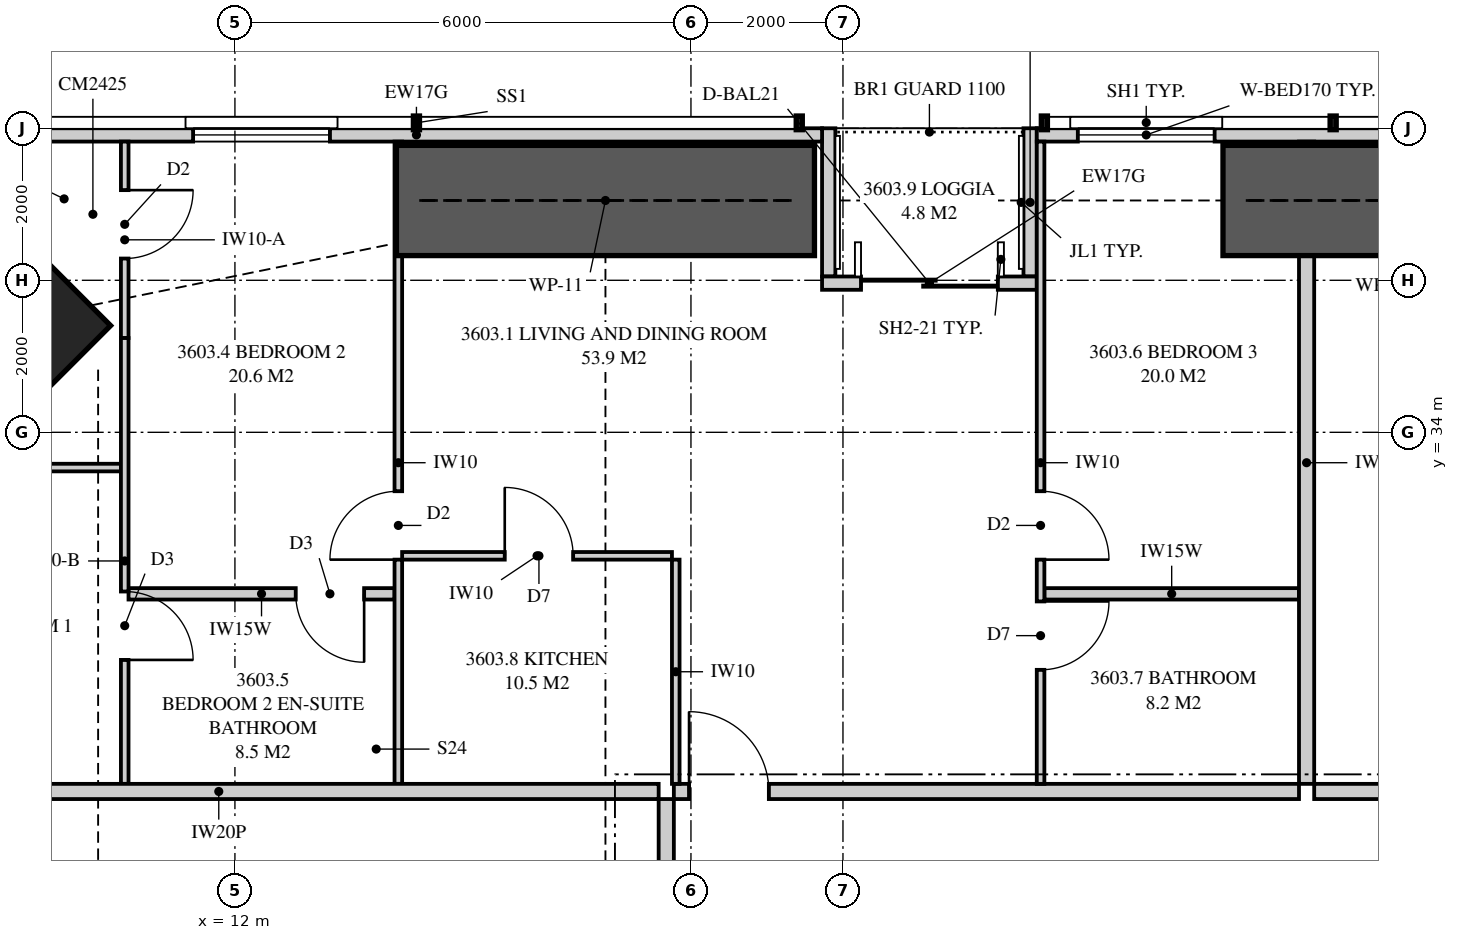
"""IFC4 building model, lengths in metres.
Left out: names, types, materials, properties, quantities, classifications, styles, units other than length and angle.
Written with IfcOpenShell. Run it as: python <this file> out.ifc"""

import sys

from ifc_helpers import new_model, si_unit, direction, frame, frame_2d, origin, origin_2d, place, context, subcontext, project, spatial, polyline, rectangle, outline, extrude, element, fill, save


model = new_model("IFC4")
c1 = context("Model", 3, precision=1e-05, world=origin(), true_north=direction((0.0, 1.0)))
c2 = subcontext(c1, "Body", "Model", "MODEL_VIEW")
j1 = project(units=[si_unit("LENGTHUNIT", "METRE"), si_unit("PLANEANGLEUNIT", "RADIAN")], contexts=[c1])
p1 = place(None, origin())
s1 = spatial("IfcSite", under=j1, at=p1, CompositionType="ELEMENT")
p2 = place(p1, origin())
s2 = spatial("IfcBuilding", under=s1, at=p2, CompositionType="ELEMENT")
p3 = place(p2, frame((0.0, 0.0, 131.65)))
s3 = spatial("IfcBuildingStorey", under=s2, at=p3, CompositionType="ELEMENT", Elevation=131.65)
p4 = place(p3, frame((8.631, 35.369, 0.0), z_axis=(0.0, 0.0, 1.0), x_axis=(0.707106781187, -0.707106781187, 0.0)))
e1 = element("IfcColumn", 1, at=p4, inside=s3, PredefinedType="COLUMN", context=c2, shape_type="SweptSolid", body=[
    extrude(rectangle(XDim=2.4, YDim=2.5, at=origin_2d()), origin(), (0.0, 0.0, 1.0), 3.35),
])
p5 = place(p3, frame((46.449, 37.913, 0.0), z_axis=(0.0, 0.0, 1.0), x_axis=(-1.0, 0.0, 0.0)))
e2 = element("IfcWall", 2, at=p5, inside=s3, PredefinedType="SOLIDWALL", context=c2, shape_type="SweptSolid", body=[
    extrude(outline(polyline([(0.0, 0.0), (23.899, 0.0), (23.899, 2.15), (7.824, 2.15), (7.824, 3.11), (7.666, 3.11), (7.666, 2.15), (7.62, 2.15), (7.62, 3.11), (0.0, 3.11), (0.0, 0.0)])), frame((0.0, 0.087, 0.0), z_axis=(0.0, -1.0, 0.0), x_axis=(1.0, 0.0, 0.0)), (0.0, 0.0, 1.0), 0.175),
])
p6 = place(p5, frame((10.9, 0.0, 0.4)))
e3 = element("IfcOpeningElement", 3, at=p6, cuts=e2, PredefinedType="OPENING", context=c2, shape_type="SweptSolid", body=[
    extrude(rectangle(XDim=1.2, YDim=1.7, at=frame_2d((0.6, 0.85))), frame((0.0, 0.097, 0.0), z_axis=(0.0, -1.0, 0.0), x_axis=(1.0, 0.0, 0.0)), (0.0, 0.0, 1.0), 0.195),
])
p7 = place(p5, frame((21.559, 0.0, 0.4)))
e4 = element("IfcOpeningElement", 4, at=p7, cuts=e2, PredefinedType="OPENING", context=c2, shape_type="SweptSolid", body=[
    extrude(rectangle(XDim=1.8, YDim=1.7, at=frame_2d((0.9, 0.85))), frame((0.0, 0.097, 0.0), z_axis=(0.0, -1.0, 0.0), x_axis=(1.0, 0.0, 0.0)), (0.0, 0.0, 1.0), 0.195),
])
p8 = place(p3, frame((19.725, 37.913, 0.0), z_axis=(0.0, 0.0, 1.0), x_axis=(-1.0, 0.0, 0.0)))
e5 = element("IfcWall", 5, at=p8, inside=s3, PredefinedType="SOLIDWALL", context=c2, shape_type="SweptSolid", body=[
    extrude(outline(polyline([(0.0, 0.0), (10.674, 0.0), (10.674, 3.11), (3.053, 3.11), (3.053, 2.15), (3.008, 2.15), (3.008, 3.11), (2.85, 3.11), (2.85, 2.15), (0.0, 2.15), (0.0, 0.0)])), frame((0.0, 0.087, 0.0), z_axis=(0.0, -1.0, 0.0), x_axis=(1.0, 0.0, 0.0)), (0.0, 0.0, 1.0), 0.175),
])
p9 = place(p8, frame((6.475, 0.0, 0.4)))
e6 = element("IfcOpeningElement", 6, at=p9, cuts=e5, PredefinedType="OPENING", context=c2, shape_type="SweptSolid", body=[
    extrude(rectangle(XDim=1.8, YDim=1.7, at=frame_2d((0.9, 0.85))), frame((0.0, 0.097, 0.0), z_axis=(0.0, -1.0, 0.0), x_axis=(1.0, 0.0, 0.0)), (0.0, 0.0, 1.0), 0.195),
])
p10 = place(p3, frame((22.55, 35.962, 0.0), z_axis=(0.0, 0.0, 1.0), x_axis=(-1.0, 0.0, 0.0)))
e7 = element("IfcWall", 7, at=p10, inside=s3, PredefinedType="SOLIDWALL", context=c2, shape_type="SweptSolid", body=[
    extrude(rectangle(XDim=2.825, YDim=0.175, at=frame_2d((1.413, 0.0))), origin(), (0.0, 0.0, 1.0), 3.11),
])
p11 = place(p10, frame((0.512, 0.0, 0.0)))
e8 = element("IfcOpeningElement", 8, at=p11, cuts=e7, PredefinedType="OPENING", context=c2, shape_type="SweptSolid", body=[
    extrude(rectangle(XDim=1.8, YDim=2.1, at=frame_2d((0.9, 1.05))), frame((0.0, 0.097, 0.0), z_axis=(0.0, -1.0, 0.0), x_axis=(1.0, 0.0, 0.0)), (0.0, 0.0, 1.0), 0.195),
])
for number, where, z_axis, x_axis in (
    (9, (22.462, 38.0, 0.0), (0.0, 0.0, 1.0), (0.0, -1.0, 0.0)),
    (10, (19.812, 38.0, 0.0), (0.0, 0.0, 1.0), (0.0, -1.0, 0.0)),
):
    element("IfcWall", number, at=place(p3, frame(where, z_axis=z_axis, x_axis=x_axis)), inside=s3, PredefinedType="SOLIDWALL", context=c2, shape_type="SweptSolid", body=[
        extrude(outline(polyline([(0.0, 0.0), (1.95, 0.0), (1.95, 3.11), (1.75, 3.11), (1.75, 2.15), (0.15, 2.15), (0.15, 3.11), (0.0, 3.11), (0.0, 0.0)])), frame((0.0, 0.087, 0.0), z_axis=(0.0, -1.0, 0.0), x_axis=(1.0, 0.0, 0.0)), (0.0, 0.0, 1.0), 0.175),
    ])
p12 = place(p3, frame((26.1, 37.825, 0.0), z_axis=(0.0, 0.0, 1.0), x_axis=(0.0, -1.0, 0.0)))
e11 = element("IfcWall", 11, at=p12, inside=s3, PredefinedType="PARTITIONING", context=c2, shape_type="SweptSolid", body=[
    extrude(outline(polyline([(0.529, 2.15), (0.0, 2.15), (0.0, 0.0), (0.529, 0.0), (0.529, 0.376), (1.021, 0.376), (1.021, 0.0), (8.45, 0.0), (8.45, 3.11), (1.685, 3.11), (1.685, 2.15), (1.021, 2.15), (1.021, 1.774), (0.529, 1.774), (0.529, 2.15)])), frame((0.0, 0.1, 0.0), z_axis=(0.0, -1.0, 0.0), x_axis=(1.0, 0.0, 0.0)), (0.0, 0.0, 1.0), 0.2),
])
p13 = place(p3, frame((17.775, 29.275, 0.0), z_axis=(0.0, 0.0, 1.0), x_axis=(1.0, 0.0, 0.0)))
e12 = element("IfcWall", 12, at=p13, inside=s3, PredefinedType="PARTITIONING", context=c2, shape_type="SweptSolid", body=[
    extrude(rectangle(XDim=8.225, YDim=0.2, at=frame_2d((4.113, 0.0))), origin(), (0.0, 0.0, 1.0), 3.11),
])
p14 = place(p13, frame((0.2, 0.0, 0.0)))
e13 = element("IfcOpeningElement", 13, at=p14, cuts=e12, PredefinedType="OPENING", context=c2, shape_type="SweptSolid", body=[
    extrude(rectangle(XDim=1.05, YDim=2.2, at=frame_2d((0.525, 1.1))), frame((0.0, 0.11, 0.0), z_axis=(0.0, -1.0, 0.0), x_axis=(1.0, 0.0, 0.0)), (0.0, 0.0, 1.0), 0.22),
])
p15 = place(p3, frame((10.55, 37.825, 0.0), z_axis=(0.0, 0.0, 1.0), x_axis=(0.0, -1.0, 0.0)))
e14 = element("IfcWall", 14, at=p15, inside=s3, PredefinedType="PARTITIONING", context=c2, shape_type="SweptSolid", body=[
    extrude(outline(polyline([(0.0, 0.0), (2.585, 0.0), (2.585, 2.15), (1.188, 2.15), (1.188, 3.11), (0.0, 3.11), (0.0, 0.0)])), frame((0.0, 0.05, 0.0), z_axis=(0.0, -1.0, 0.0), x_axis=(1.0, 0.0, 0.0)), (0.0, 0.0, 1.0), 0.1),
])
p16 = place(p15, frame((0.639, 0.0, 0.0)))
e15 = element("IfcOpeningElement", 15, at=p16, cuts=e14, PredefinedType="OPENING", context=c2, shape_type="SweptSolid", body=[
    extrude(rectangle(XDim=0.9, YDim=2.1, at=frame_2d((0.45, 1.05))), frame((0.0, 0.06, 0.0), z_axis=(0.0, -1.0, 0.0), x_axis=(1.0, 0.0, 0.0)), (0.0, 0.0, 1.0), 0.12),
])
p17 = place(p3, frame((10.55, 35.24, 0.0), z_axis=(0.0, 0.0, 1.0), x_axis=(0.0, -1.0, 0.0)))
e16 = element("IfcWall", 16, at=p17, inside=s3, PredefinedType="PARTITIONING", context=c2, shape_type="SweptSolid", body=[
    extrude(outline(polyline([(0.0, 0.0), (5.865, 0.0), (5.865, 2.51), (0.358, 2.51), (0.358, 2.15), (0.0, 2.15), (0.0, 0.0)])), frame((0.0, 0.05, 0.0), z_axis=(0.0, -1.0, 0.0), x_axis=(1.0, 0.0, 0.0)), (0.0, 0.0, 1.0), 0.1),
])
p18 = place(p17, frame((3.334, 0.0, 0.0)))
e17 = element("IfcOpeningElement", 17, at=p18, cuts=e16, PredefinedType="OPENING", context=c2, shape_type="SweptSolid", body=[
    extrude(rectangle(XDim=0.9, YDim=2.1, at=frame_2d((0.45, 1.05))), frame((0.0, 0.06, 0.0), z_axis=(0.0, -1.0, 0.0), x_axis=(1.0, 0.0, 0.0)), (0.0, 0.0, 1.0), 0.12),
])
p19 = place(p3, frame((14.15, 37.825, 0.0), z_axis=(0.0, 0.0, 1.0), x_axis=(0.0, -1.0, 0.0)))
e18 = element("IfcWall", 18, at=p19, inside=s3, PredefinedType="PARTITIONING", context=c2, shape_type="SweptSolid", body=[
    extrude(outline(polyline([(0.0, 0.0), (8.45, 0.0), (8.45, 3.11), (2.208, 3.11), (2.208, 2.15), (0.453, 2.15), (0.453, 3.11), (0.0, 3.11), (0.0, 0.0)])), frame((0.0, 0.05, 0.0), z_axis=(0.0, -1.0, 0.0), x_axis=(1.0, 0.0, 0.0)), (0.0, 0.0, 1.0), 0.1),
])
p20 = place(p19, frame((4.6, 0.0, 0.0)))
e19 = element("IfcOpeningElement", 19, at=p20, cuts=e18, PredefinedType="OPENING", context=c2, shape_type="SweptSolid", body=[
    extrude(rectangle(XDim=0.9, YDim=2.1, at=frame_2d((0.45, 1.05))), frame((0.0, 0.06, 0.0), z_axis=(0.0, -1.0, 0.0), x_axis=(1.0, 0.0, 0.0)), (0.0, 0.0, 1.0), 0.12),
])
p21 = place(p3, frame((22.6, 37.825, 0.0), z_axis=(0.0, 0.0, 1.0), x_axis=(0.0, -1.0, 0.0)))
e20 = element("IfcWall", 20, at=p21, inside=s3, PredefinedType="PARTITIONING", context=c2, shape_type="SweptSolid", body=[
    extrude(outline(polyline([(0.0, 0.0), (8.45, 0.0), (8.45, 3.11), (1.635, 3.11), (1.635, 2.15), (0.0, 2.15), (0.0, 3.11), (0.0, 0.0)])), frame((0.0, 0.05, 0.0), z_axis=(0.0, -1.0, 0.0), x_axis=(1.0, 0.0, 0.0)), (0.0, 0.0, 1.0), 0.1),
])
p22 = place(p21, frame((4.6, 0.0, 0.0)))
e21 = element("IfcOpeningElement", 21, at=p22, cuts=e20, PredefinedType="OPENING", context=c2, shape_type="SweptSolid", body=[
    extrude(rectangle(XDim=0.9, YDim=2.1, at=frame_2d((0.45, 1.05))), frame((0.0, 0.06, 0.0), z_axis=(0.0, -1.0, 0.0), x_axis=(1.0, 0.0, 0.0)), (0.0, 0.0, 1.0), 0.12),
])
p23 = place(p21, frame((6.05, 0.0, 0.0)))
e22 = element("IfcOpeningElement", 22, at=p23, cuts=e20, PredefinedType="OPENING", context=c2, shape_type="SweptSolid", body=[
    extrude(rectangle(XDim=0.9, YDim=2.1, at=frame_2d((0.45, 1.05))), frame((0.0, 0.06, 0.0), z_axis=(0.0, -1.0, 0.0), x_axis=(1.0, 0.0, 0.0)), (0.0, 0.0, 1.0), 0.12),
])
p24 = place(p3, frame((6.0, 33.536, 0.0), z_axis=(0.0, 0.0, 1.0), x_axis=(1.0, 0.0, 0.0)))
e23 = element("IfcWall", 23, at=p24, inside=s3, PredefinedType="PARTITIONING", context=c2, shape_type="SweptSolid", body=[
    extrude(outline(polyline([(0.0, 0.0), (4.5, 0.0), (4.5, 3.11), (4.5, 2.51), (3.206, 2.51), (3.206, 2.15), (1.463, 2.15), (1.463, 3.11), (0.0, 3.11), (0.0, 0.0)])), frame((0.0, 0.05, 0.0), z_axis=(0.0, -1.0, 0.0), x_axis=(1.0, 0.0, 0.0)), (0.0, 0.0, 1.0), 0.1),
])
p25 = place(p24, frame((0.7, 0.0, 0.0)))
e24 = element("IfcOpeningElement", 24, at=p25, cuts=e23, PredefinedType="OPENING", context=c2, shape_type="SweptSolid", body=[
    extrude(rectangle(XDim=0.9, YDim=2.1, at=frame_2d((0.45, 1.05))), frame((0.0, 0.06, 0.0), z_axis=(0.0, -1.0, 0.0), x_axis=(1.0, 0.0, 0.0)), (0.0, 0.0, 1.0), 0.12),
])
p26 = place(p3, frame((10.6, 31.875, 0.0), z_axis=(0.0, 0.0, 1.0), x_axis=(1.0, 0.0, 0.0)))
e25 = element("IfcWall", 25, at=p26, inside=s3, PredefinedType="PLUMBINGWALL", context=c2, shape_type="SweptSolid", body=[
    extrude(outline(polyline([(0.0, 0.0), (3.5, 0.0), (3.5, 3.11), (0.885, 3.11), (0.885, 2.51), (0.0, 2.51), (0.0, 3.11), (0.0, 0.0)])), frame((0.0, 0.075, 0.0), z_axis=(0.0, -1.0, 0.0), x_axis=(1.0, 0.0, 0.0)), (0.0, 0.0, 1.0), 0.15),
])
p27 = place(p26, frame((2.2, 0.0, 0.0)))
e26 = element("IfcOpeningElement", 26, at=p27, cuts=e25, PredefinedType="OPENING", context=c2, shape_type="SweptSolid", body=[
    extrude(rectangle(XDim=0.9, YDim=2.1, at=frame_2d((0.45, 1.05))), frame((0.0, 0.085, 0.0), z_axis=(0.0, -1.0, 0.0), x_axis=(1.0, 0.0, 0.0)), (0.0, 0.0, 1.0), 0.17),
])
p28 = place(p3, frame((22.65, 31.875, 0.0), z_axis=(0.0, 0.0, 1.0), x_axis=(1.0, 0.0, 0.0)))
e27 = element("IfcWall", 27, at=p28, inside=s3, PredefinedType="PLUMBINGWALL", context=c2, shape_type="SweptSolid", body=[
    extrude(rectangle(XDim=3.35, YDim=0.15, at=frame_2d((1.675, 0.0))), origin(), (0.0, 0.0, 1.0), 3.11),
])
p29 = place(p3, frame((14.2, 32.375, 0.0), z_axis=(0.0, 0.0, 1.0), x_axis=(1.0, 0.0, 0.0)))
e28 = element("IfcWall", 28, at=p29, inside=s3, PredefinedType="PARTITIONING", context=c2, shape_type="SweptSolid", body=[
    extrude(outline(polyline([(0.0, 0.0), (3.55, 0.0), (3.55, 3.11), (2.962, 3.11), (2.962, 2.541), (2.388, 2.541), (2.388, 3.11), (0.0, 3.11), (0.0, 0.0)])), frame((0.0, 0.05, 0.0), z_axis=(0.0, -1.0, 0.0), x_axis=(1.0, 0.0, 0.0)), (0.0, 0.0, 1.0), 0.1),
])
p30 = place(p29, frame((1.35, 0.0, 0.0)))
e29 = element("IfcOpeningElement", 29, at=p30, cuts=e28, PredefinedType="OPENING", context=c2, shape_type="SweptSolid", body=[
    extrude(rectangle(XDim=0.9, YDim=2.1, at=frame_2d((0.45, 1.05))), frame((0.0, 0.06, 0.0), z_axis=(0.0, -1.0, 0.0), x_axis=(1.0, 0.0, 0.0)), (0.0, 0.0, 1.0), 0.12),
])
p31 = place(p3, frame((17.8, 32.325, 0.0), z_axis=(0.0, 0.0, 1.0), x_axis=(0.0, -1.0, 0.0)))
e30 = element("IfcWall", 30, at=p31, inside=s3, PredefinedType="PARTITIONING", context=c2, shape_type="SweptSolid", body=[
    extrude(rectangle(XDim=2.95, YDim=0.1, at=frame_2d((1.475, 0.0))), origin(), (0.0, 0.0, 1.0), 3.11),
])
p32 = place(p3, frame((26.2, 29.275, 0.0), z_axis=(0.0, 0.0, 1.0), x_axis=(1.0, 0.0, 0.0)))
e31 = element("IfcWall", 31, at=p32, inside=s3, PredefinedType="PARTITIONING", context=c2, shape_type="SweptSolid", body=[
    extrude(outline(polyline([(0.0, 0.0), (7.713, 0.0), (7.712, 3.11), (1.887, 3.11), (1.887, 2.541), (1.213, 2.541), (1.213, 3.11), (0.0, 3.11), (0.0, 0.0)])), frame((0.0, 0.1, 0.0), z_axis=(0.0, -1.0, 0.0), x_axis=(1.0, 0.0, 0.0)), (0.0, 0.0, 1.0), 0.2),
])
p33 = place(p3, frame((6.0, 29.275, 0.0), z_axis=(0.0, 0.0, 1.0), x_axis=(1.0, 0.0, 0.0)))
e32 = element("IfcWall", 32, at=p33, inside=s3, PredefinedType="PARTITIONING", context=c2, shape_type="SweptSolid", body=[
    extrude(outline(polyline([(0.0, 0.0), (11.575, 0.0), (11.575, 3.11), (11.212, 3.11), (11.212, 2.541), (10.538, 2.541), (10.538, 3.11), (5.51, 3.11), (5.51, 2.51), (2.969, 2.51), (2.969, 2.541), (2.565, 2.541), (2.565, 2.15), (0.721, 2.15), (0.721, 3.11), (0.0, 3.11), (0.0, 0.0)])), frame((0.0, 0.1, 0.0), z_axis=(0.0, -1.0, 0.0), x_axis=(1.0, 0.0, 0.0)), (0.0, 0.0, 1.0), 0.2),
])
p34 = place(p3, frame((17.675, 23.45, 0.0), z_axis=(0.0, 0.0, 1.0), x_axis=(0.0, 1.0, 0.0)))
e33 = element("IfcWall", 33, at=p34, inside=s3, PredefinedType="PARTITIONING", context=c2, shape_type="SweptSolid", body=[
    extrude(outline(polyline([(0.0, 0.0), (5.725, 0.0), (5.725, 3.11), (3.312, 3.11), (3.312, 2.541), (2.638, 2.541), (2.638, 3.11), (0.0, 3.11), (0.0, 0.0)])), frame((0.0, 0.1, 0.0), z_axis=(0.0, -1.0, 0.0), x_axis=(1.0, 0.0, 0.0)), (0.0, 0.0, 1.0), 0.2),
])
p35 = place(p34, frame((1.962, 0.0, 0.0)))
e34 = element("IfcOpeningElement", 34, at=p35, cuts=e33, PredefinedType="OPENING", context=c2, shape_type="SweptSolid", body=[
    extrude(rectangle(XDim=1.8, YDim=2.1, at=frame_2d((0.9, 1.05))), frame((0.0, 0.11, 0.0), z_axis=(0.0, -1.0, 0.0), x_axis=(1.0, 0.0, 0.0)), (0.0, 0.0, 1.0), 0.22),
])
for number, where, z_axis, x_axis in (
    (35, (25.0, 37.05, 0.0), (0.0, 0.0, 1.0), (1.0, 0.0, 0.0)),
    (36, (14.125, 37.05, 0.0), (0.0, 0.0, 1.0), (1.0, 0.0, 0.0)),
):
    element("IfcWall", number, at=place(p3, frame(where, z_axis=z_axis, x_axis=x_axis)), inside=s3, PredefinedType="SHEAR", context=c2, shape_type="SweptSolid", body=[
        extrude(rectangle(XDim=5.5, YDim=1.45, at=frame_2d((2.75, 0.0))), origin(), (0.0, 0.0, 1.0), 3.35),
    ])
p36 = place(p7, origin())
e37 = element("IfcWindow", 37, at=p36, inside=s3, PartitioningType="SINGLE_PANEL", PredefinedType="WINDOW", context=c2, shape_type="SweptSolid", body=[
    extrude(rectangle(XDim=1.8, YDim=1.7, at=frame_2d((0.9, 0.85))), frame((0.0, 0.03, 0.0), z_axis=(0.0, -1.0, 0.0), x_axis=(1.0, 0.0, 0.0)), (0.0, 0.0, 1.0), 0.06),
])
fill(e4, e37)
p37 = place(p11, origin())
e38 = element("IfcDoor", 38, at=p37, inside=s3, OperationType="SLIDING_TO_LEFT", PredefinedType="DOOR", context=c2, shape_type="SweptSolid", body=[
    extrude(rectangle(XDim=1.8, YDim=2.1, at=frame_2d((0.9, 1.05))), frame((0.0, 0.025, 0.0), z_axis=(0.0, -1.0, 0.0), x_axis=(1.0, 0.0, 0.0)), (0.0, 0.0, 1.0), 0.05),
])
fill(e8, e38)
p38 = place(p9, origin())
e39 = element("IfcWindow", 39, at=p38, inside=s3, PartitioningType="SINGLE_PANEL", PredefinedType="WINDOW", context=c2, shape_type="SweptSolid", body=[
    extrude(rectangle(XDim=1.8, YDim=1.7, at=frame_2d((0.9, 0.85))), frame((0.0, 0.03, 0.0), z_axis=(0.0, -1.0, 0.0), x_axis=(1.0, 0.0, 0.0)), (0.0, 0.0, 1.0), 0.06),
])
fill(e6, e39)
p39 = place(p14, origin())
e40 = element("IfcDoor", 40, at=p39, inside=s3, OperationType="SINGLE_SWING_LEFT", PredefinedType="DOOR", context=c2, shape_type="SweptSolid", body=[
    extrude(rectangle(XDim=1.05, YDim=2.2, at=frame_2d((0.525, 1.1))), frame((0.0, 0.025, 0.0), z_axis=(0.0, -1.0, 0.0), x_axis=(1.0, 0.0, 0.0)), (0.0, 0.0, 1.0), 0.05),
])
fill(e13, e40)
p40 = place(p16, origin())
e41 = element("IfcDoor", 41, at=p40, inside=s3, OperationType="SINGLE_SWING_LEFT", PredefinedType="DOOR", context=c2, shape_type="SweptSolid", body=[
    extrude(rectangle(XDim=0.9, YDim=2.1, at=frame_2d((0.45, 1.05))), frame((0.0, 0.025, 0.0), z_axis=(0.0, -1.0, 0.0), x_axis=(1.0, 0.0, 0.0)), (0.0, 0.0, 1.0), 0.05),
])
fill(e15, e41)
p41 = place(p20, frame((0.9, 0.0, 0.0), z_axis=(0.0, 0.0, 1.0), x_axis=(-1.0, 0.0, 0.0)))
e42 = element("IfcDoor", 42, at=p41, inside=s3, OperationType="SINGLE_SWING_LEFT", PredefinedType="DOOR", context=c2, shape_type="SweptSolid", body=[
    extrude(rectangle(XDim=0.9, YDim=2.1, at=frame_2d((0.45, 1.05))), frame((0.0, 0.025, 0.0), z_axis=(0.0, -1.0, 0.0), x_axis=(1.0, 0.0, 0.0)), (0.0, 0.0, 1.0), 0.05),
])
fill(e19, e42)
p42 = place(p27, frame((0.9, 0.0, 0.0), z_axis=(0.0, 0.0, 1.0), x_axis=(-1.0, 0.0, 0.0)))
e43 = element("IfcDoor", 43, at=p42, inside=s3, OperationType="SINGLE_SWING_LEFT", PredefinedType="DOOR", context=c2, shape_type="SweptSolid", body=[
    extrude(rectangle(XDim=0.9, YDim=2.1, at=frame_2d((0.45, 1.05))), frame((0.0, 0.025, 0.0), z_axis=(0.0, -1.0, 0.0), x_axis=(1.0, 0.0, 0.0)), (0.0, 0.0, 1.0), 0.05),
])
fill(e26, e43)
p43 = place(p22, origin())
e44 = element("IfcDoor", 44, at=p43, inside=s3, OperationType="SINGLE_SWING_RIGHT", PredefinedType="DOOR", context=c2, shape_type="SweptSolid", body=[
    extrude(rectangle(XDim=0.9, YDim=2.1, at=frame_2d((0.45, 1.05))), frame((0.0, 0.025, 0.0), z_axis=(0.0, -1.0, 0.0), x_axis=(1.0, 0.0, 0.0)), (0.0, 0.0, 1.0), 0.05),
])
fill(e21, e44)
p44 = place(p23, origin())
e45 = element("IfcDoor", 45, at=p44, inside=s3, OperationType="SINGLE_SWING_LEFT", PredefinedType="DOOR", context=c2, shape_type="SweptSolid", body=[
    extrude(rectangle(XDim=0.9, YDim=2.1, at=frame_2d((0.45, 1.05))), frame((0.0, 0.025, 0.0), z_axis=(0.0, -1.0, 0.0), x_axis=(1.0, 0.0, 0.0)), (0.0, 0.0, 1.0), 0.05),
])
fill(e22, e45)
p45 = place(p18, origin())
e46 = element("IfcDoor", 46, at=p45, inside=s3, OperationType="SINGLE_SWING_RIGHT", PredefinedType="DOOR", context=c2, shape_type="SweptSolid", body=[
    extrude(rectangle(XDim=0.9, YDim=2.1, at=frame_2d((0.45, 1.05))), frame((0.0, 0.025, 0.0), z_axis=(0.0, -1.0, 0.0), x_axis=(1.0, 0.0, 0.0)), (0.0, 0.0, 1.0), 0.05),
])
fill(e17, e46)
p46 = place(p30, origin())
e47 = element("IfcDoor", 47, at=p46, inside=s3, OperationType="SINGLE_SWING_LEFT", PredefinedType="DOOR", context=c2, shape_type="SweptSolid", body=[
    extrude(rectangle(XDim=0.9, YDim=2.1, at=frame_2d((0.45, 1.05))), frame((0.0, 0.025, 0.0), z_axis=(0.0, -1.0, 0.0), x_axis=(1.0, 0.0, 0.0)), (0.0, 0.0, 1.0), 0.05),
])
fill(e29, e47)
save(model, sys.argv[1])
